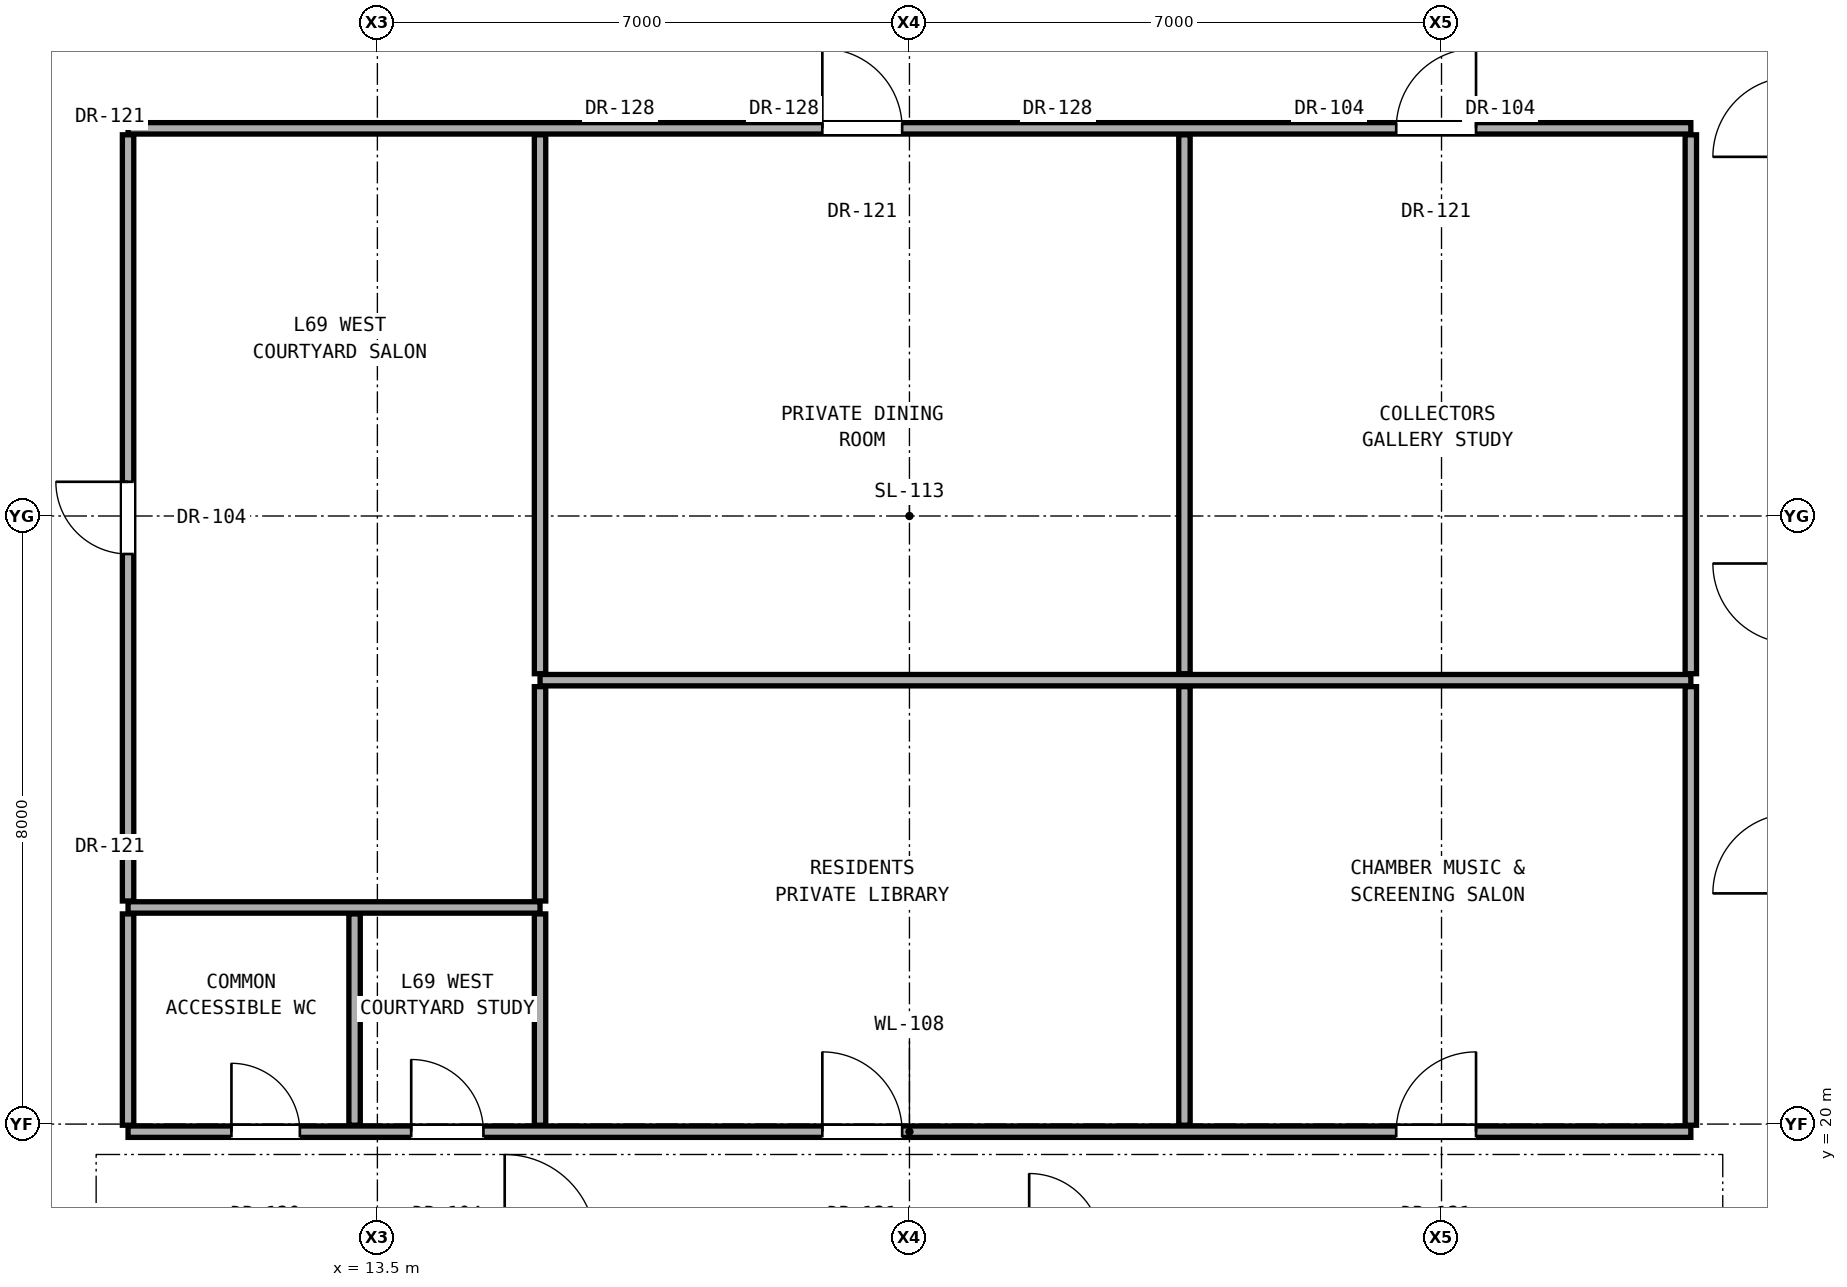
"""IFC4 building model, lengths in metres.
Left out: names, types, materials, properties, quantities, classifications, styles, units other than length and angle.
Written with IfcOpenShell. Run it as: python <this file> out.ifc"""

import sys

from ifc_helpers import new_model, si_unit, direction, frame, frame_2d, origin, place, context, subcontext, project, spatial, rectangle, extrude, element, fill, save


model = new_model("IFC4")
c1 = context("Model", 3, precision=1e-05, world=origin(), true_north=direction((0.0, 1.0)))
c2 = subcontext(c1, "Body", "Model", "MODEL_VIEW")
j1 = project(units=[si_unit("LENGTHUNIT", "METRE"), si_unit("PLANEANGLEUNIT", "RADIAN")], contexts=[c1])
p1 = place(None, origin())
s1 = spatial("IfcSite", under=j1, at=p1, CompositionType="ELEMENT")
p2 = place(p1, origin())
s2 = spatial("IfcBuilding", under=s1, at=p2, CompositionType="ELEMENT")
p3 = place(p2, frame((0.0, 0.0, 242.5)))
s3 = spatial("IfcBuildingStorey", under=s2, at=p3, CompositionType="ELEMENT", Elevation=242.5)
p4 = place(p3, frame((10.22, 19.9, 0.0), z_axis=(0.0, 0.0, 1.0), x_axis=(1.0, 0.0, 0.0)))
e1 = element("IfcWall", 1, at=p4, inside=s3, PredefinedType="PARTITIONING", context=c2, shape_type="SweptSolid", body=[
    extrude(rectangle(XDim=20.56, YDim=0.15, at=frame_2d((10.28, 0.0))), origin(), (0.0, 0.0, 1.0), 2.236),
])
p5 = place(p4, frame((1.36, 0.0, 0.0)))
e2 = element("IfcOpeningElement", 2, at=p5, cuts=e1, PredefinedType="OPENING", context=c2, shape_type="SweptSolid", body=[
    extrude(rectangle(XDim=0.9, YDim=2.1, at=frame_2d((0.45, 1.05))), frame((0.0, 0.085, 0.0), z_axis=(0.0, -1.0, 0.0), x_axis=(1.0, 0.0, 0.0)), (0.0, 0.0, 1.0), 0.17),
])
p6 = place(p4, frame((3.725, 0.0, 0.0)))
e3 = element("IfcOpeningElement", 3, at=p6, cuts=e1, PredefinedType="OPENING", context=c2, shape_type="SweptSolid", body=[
    extrude(rectangle(XDim=0.95, YDim=2.15, at=frame_2d((0.475, 1.075))), frame((0.0, 0.085, 0.0), z_axis=(0.0, -1.0, 0.0), x_axis=(1.0, 0.0, 0.0)), (0.0, 0.0, 1.0), 0.17),
])
p7 = place(p4, frame((9.134, 0.0, 0.0)))
e4 = element("IfcOpeningElement", 4, at=p7, cuts=e1, PredefinedType="OPENING", context=c2, shape_type="SweptSolid", body=[
    extrude(rectangle(XDim=1.05, YDim=2.2, at=frame_2d((0.525, 1.1))), frame((0.0, 0.085, 0.0), z_axis=(0.0, -1.0, 0.0), x_axis=(1.0, 0.0, 0.0)), (0.0, 0.0, 1.0), 0.17),
])
p8 = place(p4, frame((16.684, 0.0, 0.0)))
e5 = element("IfcOpeningElement", 5, at=p8, cuts=e1, PredefinedType="OPENING", context=c2, shape_type="SweptSolid", body=[
    extrude(rectangle(XDim=1.05, YDim=2.2, at=frame_2d((0.525, 1.1))), frame((0.0, 0.085, 0.0), z_axis=(0.0, -1.0, 0.0), x_axis=(1.0, 0.0, 0.0)), (0.0, 0.0, 1.0), 0.17),
])
p9 = place(p3, frame((10.22, 22.85, 0.0), z_axis=(0.0, 0.0, 1.0), x_axis=(1.0, 0.0, 0.0)))
e6 = element("IfcWall", 6, at=p9, inside=s3, PredefinedType="PARTITIONING", context=c2, shape_type="SweptSolid", body=[
    extrude(rectangle(XDim=5.42, YDim=0.15, at=frame_2d((2.71, 0.0))), origin(), (0.0, 0.0, 1.0), 2.236),
])
p10 = place(p3, frame((15.64, 25.84, 0.0), z_axis=(0.0, 0.0, 1.0), x_axis=(1.0, 0.0, 0.0)))
e7 = element("IfcWall", 7, at=p10, inside=s3, PredefinedType="PARTITIONING", context=c2, shape_type="SweptSolid", body=[
    extrude(rectangle(XDim=15.14, YDim=0.15, at=frame_2d((7.57, 0.0))), origin(), (0.0, 0.0, 1.0), 2.236),
])
p11 = place(p3, frame((10.22, 33.1, 0.0), z_axis=(0.0, 0.0, 1.0), x_axis=(1.0, 0.0, 0.0)))
e8 = element("IfcWall", 8, at=p11, inside=s3, PredefinedType="PARTITIONING", context=c2, shape_type="SweptSolid", body=[
    extrude(rectangle(XDim=20.56, YDim=0.15, at=frame_2d((10.28, 0.0))), origin(), (0.0, 0.0, 1.0), 2.236),
])
p12 = place(p11, frame((9.134, 0.0, 0.0)))
e9 = element("IfcOpeningElement", 9, at=p12, cuts=e8, PredefinedType="OPENING", context=c2, shape_type="SweptSolid", body=[
    extrude(rectangle(XDim=1.05, YDim=2.2, at=frame_2d((0.525, 1.1))), frame((0.0, 0.085, 0.0), z_axis=(0.0, -1.0, 0.0), x_axis=(1.0, 0.0, 0.0)), (0.0, 0.0, 1.0), 0.17),
])
p13 = place(p11, frame((16.684, 0.0, 0.0)))
e10 = element("IfcOpeningElement", 10, at=p13, cuts=e8, PredefinedType="OPENING", context=c2, shape_type="SweptSolid", body=[
    extrude(rectangle(XDim=1.05, YDim=2.2, at=frame_2d((0.525, 1.1))), frame((0.0, 0.085, 0.0), z_axis=(0.0, -1.0, 0.0), x_axis=(1.0, 0.0, 0.0)), (0.0, 0.0, 1.0), 0.17),
])
p14 = place(p3, frame((10.22, 19.985, 0.0), z_axis=(0.0, 0.0, 1.0), x_axis=(0.0, 1.0, 0.0)))
e11 = element("IfcWall", 11, at=p14, inside=s3, PredefinedType="PARTITIONING", context=c2, shape_type="SweptSolid", body=[
    extrude(rectangle(XDim=2.78, YDim=0.15, at=frame_2d((1.39, 0.0))), origin(), (0.0, 0.0, 1.0), 3.1),
])
p15 = place(p3, frame((10.22, 22.935, 0.0), z_axis=(0.0, 0.0, 1.0), x_axis=(0.0, 1.0, 0.0)))
e12 = element("IfcWall", 12, at=p15, inside=s3, PredefinedType="PARTITIONING", context=c2, shape_type="SweptSolid", body=[
    extrude(rectangle(XDim=10.08, YDim=0.15, at=frame_2d((5.04, 0.0))), origin(), (0.0, 0.0, 1.0), 2.396),
])
p16 = place(p15, frame((4.565, 0.0, 0.0)))
e13 = element("IfcOpeningElement", 13, at=p16, cuts=e12, PredefinedType="OPENING", context=c2, shape_type="SweptSolid", body=[
    extrude(rectangle(XDim=0.95, YDim=2.15, at=frame_2d((0.475, 1.075))), frame((0.0, 0.085, 0.0), z_axis=(0.0, -1.0, 0.0), x_axis=(1.0, 0.0, 0.0)), (0.0, 0.0, 1.0), 0.17),
])
p17 = place(p3, frame((13.2, 19.985, 0.0), z_axis=(0.0, 0.0, 1.0), x_axis=(0.0, 1.0, 0.0)))
e14 = element("IfcWall", 14, at=p17, inside=s3, PredefinedType="PARTITIONING", context=c2, shape_type="SweptSolid", body=[
    extrude(rectangle(XDim=2.78, YDim=0.15, at=frame_2d((1.39, 0.0))), origin(), (0.0, 0.0, 1.0), 3.1),
])
p18 = place(p3, frame((15.64, 19.985, 0.0), z_axis=(0.0, 0.0, 1.0), x_axis=(0.0, 1.0, 0.0)))
e15 = element("IfcWall", 15, at=p18, inside=s3, PredefinedType="PARTITIONING", context=c2, shape_type="SweptSolid", body=[
    extrude(rectangle(XDim=2.78, YDim=0.15, at=frame_2d((1.39, 0.0))), origin(), (0.0, 0.0, 1.0), 2.675),
])
p19 = place(p3, frame((15.64, 22.935, 0.0), z_axis=(0.0, 0.0, 1.0), x_axis=(0.0, 1.0, 0.0)))
e16 = element("IfcWall", 16, at=p19, inside=s3, PredefinedType="PARTITIONING", context=c2, shape_type="SweptSolid", body=[
    extrude(rectangle(XDim=2.82, YDim=0.15, at=frame_2d((1.41, 0.0))), origin(), (0.0, 0.0, 1.0), 2.236),
])
p20 = place(p3, frame((15.64, 25.925, 0.0), z_axis=(0.0, 0.0, 1.0), x_axis=(0.0, 1.0, 0.0)))
e17 = element("IfcWall", 17, at=p20, inside=s3, PredefinedType="PARTITIONING", context=c2, shape_type="SweptSolid", body=[
    extrude(rectangle(XDim=7.09, YDim=0.15, at=frame_2d((3.545, 0.0))), origin(), (0.0, 0.0, 1.0), 2.236),
])
p21 = place(p3, frame((24.118, 19.985, 0.0), z_axis=(0.0, 0.0, 1.0), x_axis=(0.0, 1.0, 0.0)))
e18 = element("IfcWall", 18, at=p21, inside=s3, PredefinedType="PARTITIONING", context=c2, shape_type="SweptSolid", body=[
    extrude(rectangle(XDim=5.77, YDim=0.15, at=frame_2d((2.885, 0.0))), origin(), (0.0, 0.0, 1.0), 2.236),
])
p22 = place(p3, frame((24.118, 25.925, 0.0), z_axis=(0.0, 0.0, 1.0), x_axis=(0.0, 1.0, 0.0)))
e19 = element("IfcWall", 19, at=p22, inside=s3, PredefinedType="PARTITIONING", context=c2, shape_type="SweptSolid", body=[
    extrude(rectangle(XDim=7.09, YDim=0.15, at=frame_2d((3.545, 0.0))), origin(), (0.0, 0.0, 1.0), 2.236),
])
p23 = place(p3, frame((30.78, 19.985, 0.0), z_axis=(0.0, 0.0, 1.0), x_axis=(0.0, 1.0, 0.0)))
e20 = element("IfcWall", 20, at=p23, inside=s3, PredefinedType="PARTITIONING", context=c2, shape_type="SweptSolid", body=[
    extrude(rectangle(XDim=5.77, YDim=0.15, at=frame_2d((2.885, 0.0))), origin(), (0.0, 0.0, 1.0), 2.396),
])
p24 = place(p3, frame((30.78, 25.925, 0.0), z_axis=(0.0, 0.0, 1.0), x_axis=(0.0, 1.0, 0.0)))
e21 = element("IfcWall", 21, at=p24, inside=s3, PredefinedType="PARTITIONING", context=c2, shape_type="SweptSolid", body=[
    extrude(rectangle(XDim=7.09, YDim=0.15, at=frame_2d((3.545, 0.0))), origin(), (0.0, 0.0, 1.0), 2.396),
])
p25 = place(p5, origin())
e22 = element("IfcDoor", 22, at=p25, inside=s3, OperationType="SINGLE_SWING_LEFT", PredefinedType="DOOR", context=c2, shape_type="SweptSolid", body=[
    extrude(rectangle(XDim=0.9, YDim=2.1, at=frame_2d((0.45, 1.05))), frame((0.0, 0.025, 0.0), z_axis=(0.0, -1.0, 0.0), x_axis=(1.0, 0.0, 0.0)), (0.0, 0.0, 1.0), 0.05),
])
fill(e2, e22)
p26 = place(p6, origin())
e23 = element("IfcDoor", 23, at=p26, inside=s3, OperationType="SINGLE_SWING_LEFT", PredefinedType="DOOR", context=c2, shape_type="SweptSolid", body=[
    extrude(rectangle(XDim=0.95, YDim=2.15, at=frame_2d((0.475, 1.075))), frame((0.0, 0.025, 0.0), z_axis=(0.0, -1.0, 0.0), x_axis=(1.0, 0.0, 0.0)), (0.0, 0.0, 1.0), 0.05),
])
fill(e3, e23)
p27 = place(p16, origin())
e24 = element("IfcDoor", 24, at=p27, inside=s3, OperationType="SINGLE_SWING_RIGHT", PredefinedType="DOOR", context=c2, shape_type="SweptSolid", body=[
    extrude(rectangle(XDim=0.95, YDim=2.15, at=frame_2d((0.475, 1.075))), frame((0.0, 0.025, 0.0), z_axis=(0.0, -1.0, 0.0), x_axis=(1.0, 0.0, 0.0)), (0.0, 0.0, 1.0), 0.05),
])
fill(e13, e24)
p28 = place(p7, origin())
e25 = element("IfcDoor", 25, at=p28, inside=s3, OperationType="SINGLE_SWING_LEFT", PredefinedType="DOOR", context=c2, shape_type="SweptSolid", body=[
    extrude(rectangle(XDim=1.05, YDim=2.2, at=frame_2d((0.525, 1.1))), frame((0.0, 0.025, 0.0), z_axis=(0.0, -1.0, 0.0), x_axis=(1.0, 0.0, 0.0)), (0.0, 0.0, 1.0), 0.05),
])
fill(e4, e25)
p29 = place(p8, origin())
e26 = element("IfcDoor", 26, at=p29, inside=s3, OperationType="SINGLE_SWING_RIGHT", PredefinedType="DOOR", context=c2, shape_type="SweptSolid", body=[
    extrude(rectangle(XDim=1.05, YDim=2.2, at=frame_2d((0.525, 1.1))), frame((0.0, 0.025, 0.0), z_axis=(0.0, -1.0, 0.0), x_axis=(1.0, 0.0, 0.0)), (0.0, 0.0, 1.0), 0.05),
])
fill(e5, e26)
p30 = place(p12, origin())
e27 = element("IfcDoor", 27, at=p30, inside=s3, OperationType="SINGLE_SWING_LEFT", PredefinedType="DOOR", context=c2, shape_type="SweptSolid", body=[
    extrude(rectangle(XDim=1.05, YDim=2.2, at=frame_2d((0.525, 1.1))), frame((0.0, 0.025, 0.0), z_axis=(0.0, -1.0, 0.0), x_axis=(1.0, 0.0, 0.0)), (0.0, 0.0, 1.0), 0.05),
])
fill(e9, e27)
p31 = place(p13, origin())
e28 = element("IfcDoor", 28, at=p31, inside=s3, OperationType="SINGLE_SWING_RIGHT", PredefinedType="DOOR", context=c2, shape_type="SweptSolid", body=[
    extrude(rectangle(XDim=1.05, YDim=2.2, at=frame_2d((0.525, 1.1))), frame((0.0, 0.025, 0.0), z_axis=(0.0, -1.0, 0.0), x_axis=(1.0, 0.0, 0.0)), (0.0, 0.0, 1.0), 0.05),
])
fill(e10, e28)
save(model, sys.argv[1])
